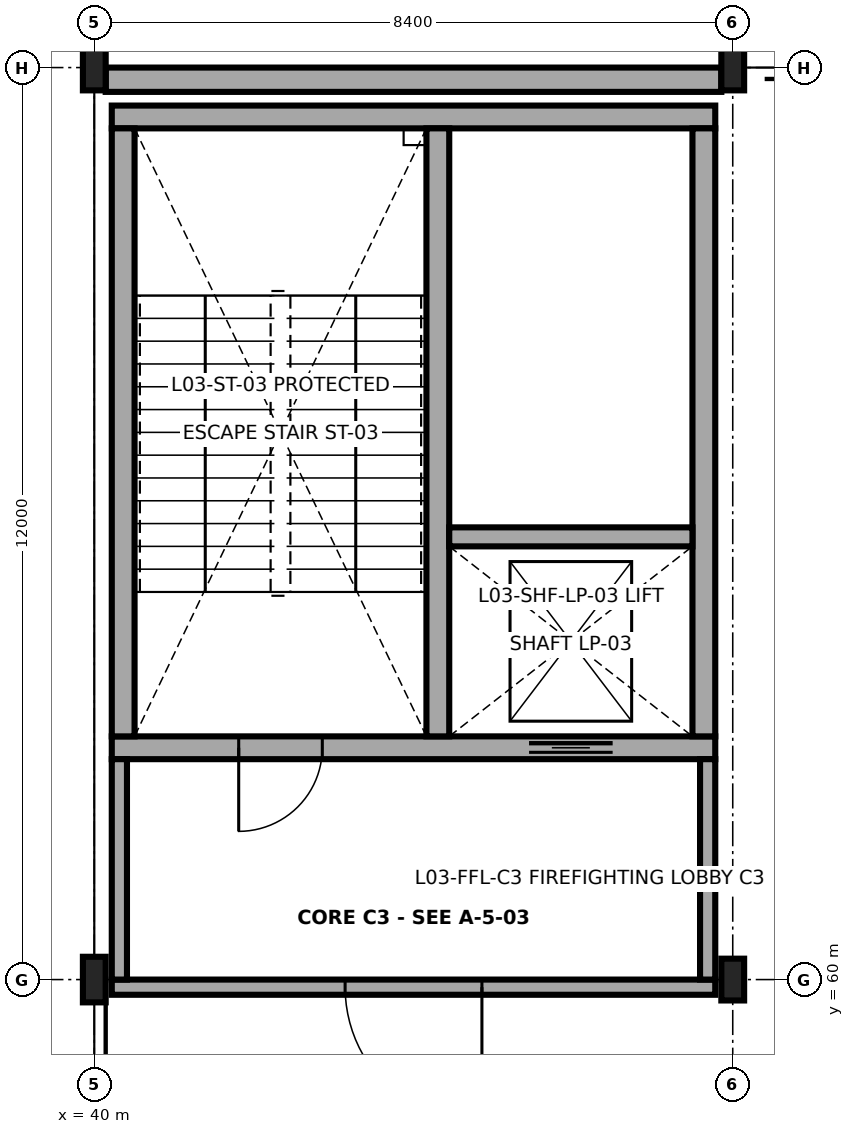
"""IFC4 building model, lengths in metres.
Left out: names, types, materials, properties, quantities, classifications, styles, units other than length and angle.
Written with IfcOpenShell. Run it as: python <this file> out.ifc"""

import sys

from ifc_helpers import new_model, si_unit, direction, frame, frame_2d, origin, origin_2d, place, context, subcontext, project, spatial, rectangle, i_section, extrude, element, fill, save


model = new_model("IFC4")
c1 = context("Model", 3, precision=1e-05, world=origin(), true_north=direction((0.0, 1.0)))
c2 = subcontext(c1, "Body", "Model", "MODEL_VIEW")
j1 = project(units=[si_unit("LENGTHUNIT", "METRE"), si_unit("PLANEANGLEUNIT", "RADIAN")], contexts=[c1])
p1 = place(None, origin())
s1 = spatial("IfcSite", under=j1, at=p1, CompositionType="ELEMENT")
p2 = place(p1, origin())
s2 = spatial("IfcBuilding", under=s1, at=p2, CompositionType="ELEMENT")
p3 = place(p2, frame((0.0, 0.0, 17.4)))
s3 = spatial("IfcBuildingStorey", under=s2, at=p3, CompositionType="ELEMENT", Elevation=17.4)
for number, where, z_axis, x_axis in (
    (1, (40.0, 60.0, 0.0), (0.0, 0.0, 1.0), (1.0, 0.0, 0.0)),
    (2, (40.0, 72.0, 0.0), (0.0, 0.0, 1.0), (1.0, 0.0, 0.0)),
):
    element("IfcColumn", number, at=place(p3, frame(where, z_axis=z_axis, x_axis=x_axis)), inside=s3, PredefinedType="COLUMN", context=c2, shape_type="SweptSolid", body=[
        extrude(i_section(OverallWidth=0.3, OverallDepth=0.6, WebThickness=0.015, FlangeThickness=0.03, FilletRadius=0.027, at=origin_2d()), origin(), (0.0, 0.0, 1.0), 4.5),
    ])
p4 = place(p3, frame((48.4, 60.0, 0.0), z_axis=(0.0, 0.0, 1.0), x_axis=(1.0, 0.0, 0.0)))
e3 = element("IfcColumn", 3, at=p4, inside=s3, PredefinedType="COLUMN", context=c2, shape_type="SweptSolid", body=[
    extrude(i_section(OverallWidth=0.3, OverallDepth=0.55, WebThickness=0.015, FlangeThickness=0.029, FilletRadius=0.027, at=origin_2d()), origin(), (0.0, 0.0, 1.0), 4.5),
])
p5 = place(p3, frame((48.4, 72.0, 0.0), z_axis=(0.0, 0.0, 1.0), x_axis=(1.0, 0.0, 0.0)))
e4 = element("IfcColumn", 4, at=p5, inside=s3, PredefinedType="COLUMN", context=c2, shape_type="SweptSolid", body=[
    extrude(i_section(OverallWidth=0.3, OverallDepth=0.6, WebThickness=0.015, FlangeThickness=0.03, FilletRadius=0.027, at=origin_2d()), origin(), (0.0, 0.0, 1.0), 4.5),
])
p6 = place(p3, frame((48.25, 71.84, 0.0), z_axis=(0.0, 0.0, 1.0), x_axis=(-1.0, 0.0, 0.0)))
e5 = element("IfcWall", 5, at=p6, inside=s3, PredefinedType="SOLIDWALL", context=c2, shape_type="SweptSolid", body=[
    extrude(rectangle(XDim=8.1, YDim=0.32, at=frame_2d((4.05, 0.0))), origin(), (0.0, 0.0, 1.0), 3.88),
])
p7 = place(p3, frame((40.23, 63.05, 0.0), z_axis=(0.0, 0.0, 1.0), x_axis=(1.0, 0.0, 0.0)))
e6 = element("IfcWall", 6, at=p7, inside=s3, PredefinedType="SHEAR", context=c2, shape_type="SweptSolid", body=[
    extrude(rectangle(XDim=7.94, YDim=0.3, at=frame_2d((3.97, 0.0))), origin(), (0.0, 0.0, 1.0), 4.25),
])
p8 = place(p7, frame((1.67, 0.0, 0.0)))
e7 = element("IfcOpeningElement", 7, at=p8, cuts=e6, PredefinedType="OPENING", context=c2, shape_type="SweptSolid", body=[
    extrude(rectangle(XDim=1.1, YDim=2.2, at=frame_2d((0.55, 1.1))), frame((0.0, 0.16, 0.0), z_axis=(0.0, -1.0, 0.0), x_axis=(1.0, 0.0, 0.0)), (0.0, 0.0, 1.0), 0.32),
])
p9 = place(p7, frame((5.49, 0.0, 0.0)))
e8 = element("IfcOpeningElement", 8, at=p9, cuts=e6, PredefinedType="OPENING", context=c2, shape_type="SweptSolid", body=[
    extrude(rectangle(XDim=1.1, YDim=2.1, at=frame_2d((0.55, 1.05))), frame((0.0, 0.16, 0.0), z_axis=(0.0, -1.0, 0.0), x_axis=(1.0, 0.0, 0.0)), (0.0, 0.0, 1.0), 0.32),
])
p10 = place(p3, frame((48.17, 71.35, 0.0), z_axis=(0.0, 0.0, 1.0), x_axis=(-1.0, 0.0, 0.0)))
e9 = element("IfcWall", 9, at=p10, inside=s3, PredefinedType="SHEAR", context=c2, shape_type="SweptSolid", body=[
    extrude(rectangle(XDim=7.94, YDim=0.3, at=frame_2d((3.97, 0.0))), origin(), (0.0, 0.0, 1.0), 4.25),
])
for number, where, z_axis, x_axis in (
    (10, (40.38, 71.2, 0.0), (0.0, 0.0, 1.0), (0.0, -1.0, 0.0)),
    (11, (48.02, 63.2, 0.0), (0.0, 0.0, 1.0), (0.0, 1.0, 0.0)),
    (12, (44.52, 63.2, 0.0), (0.0, 0.0, 1.0), (0.0, 1.0, 0.0)),
):
    element("IfcWall", number, at=place(p3, frame(where, z_axis=z_axis, x_axis=x_axis)), inside=s3, PredefinedType="SHEAR", context=c2, shape_type="SweptSolid", body=[
        extrude(rectangle(XDim=8.0, YDim=0.3, at=frame_2d((4.0, 0.0))), origin(), (0.0, 0.0, 1.0), 4.25),
    ])
p11 = place(p3, frame((44.67, 65.825, 0.0), z_axis=(0.0, 0.0, 1.0), x_axis=(1.0, 0.0, 0.0)))
e13 = element("IfcWall", 13, at=p11, inside=s3, PredefinedType="SHEAR", context=c2, shape_type="SweptSolid", body=[
    extrude(rectangle(XDim=3.2, YDim=0.25, at=frame_2d((1.6, 0.0))), origin(), (0.0, 0.0, 1.0), 4.25),
])
p12 = place(p3, frame((48.17, 59.9, 0.0), z_axis=(0.0, 0.0, 1.0), x_axis=(-1.0, 0.0, 0.0)))
e14 = element("IfcWall", 14, at=p12, inside=s3, PredefinedType="SOLIDWALL", context=c2, shape_type="SweptSolid", body=[
    extrude(rectangle(XDim=7.94, YDim=0.2, at=frame_2d((3.97, 0.0))), origin(), (0.0, 0.0, 1.0), 3.532),
])
p13 = place(p12, frame((3.07, 0.0, 0.0)))
e15 = element("IfcOpeningElement", 15, at=p13, cuts=e14, PredefinedType="OPENING", context=c2, shape_type="SweptSolid", body=[
    extrude(rectangle(XDim=1.8, YDim=2.2, at=frame_2d((0.9, 1.1))), frame((0.0, 0.11, 0.0), z_axis=(0.0, -1.0, 0.0), x_axis=(1.0, 0.0, 0.0)), (0.0, 0.0, 1.0), 0.22),
])
for number, where, z_axis, x_axis in (
    (16, (40.33, 60.0, 0.0), (0.0, 0.0, 1.0), (0.0, 1.0, 0.0)),
    (17, (48.07, 62.9, 0.0), (0.0, 0.0, 1.0), (0.0, -1.0, 0.0)),
):
    element("IfcWall", number, at=place(p3, frame(where, z_axis=z_axis, x_axis=x_axis)), inside=s3, PredefinedType="SOLIDWALL", context=c2, shape_type="SweptSolid", body=[
        extrude(rectangle(XDim=2.9, YDim=0.2, at=frame_2d((1.45, 0.0))), origin(), (0.0, 0.0, 1.0), 3.942),
    ])
p14 = place(p8, origin())
e18 = element("IfcDoor", 18, at=p14, inside=s3, OperationType="SINGLE_SWING_RIGHT", PredefinedType="DOOR", context=c2, shape_type="SweptSolid", body=[
    extrude(rectangle(XDim=1.1, YDim=2.2, at=frame_2d((0.55, 1.1))), frame((0.0, 0.025, 0.0), z_axis=(0.0, -1.0, 0.0), x_axis=(1.0, 0.0, 0.0)), (0.0, 0.0, 1.0), 0.05),
])
fill(e7, e18)
p15 = place(p9, origin())
e19 = element("IfcDoor", 19, at=p15, inside=s3, OperationType="SLIDING_TO_LEFT", PredefinedType="DOOR", context=c2, shape_type="SweptSolid", body=[
    extrude(rectangle(XDim=1.1, YDim=2.1, at=frame_2d((0.55, 1.05))), frame((0.0, 0.025, 0.0), z_axis=(0.0, -1.0, 0.0), x_axis=(1.0, 0.0, 0.0)), (0.0, 0.0, 1.0), 0.05),
])
fill(e8, e19)
p16 = place(p13, origin())
e20 = element("IfcDoor", 20, at=p16, inside=s3, OperationType="DOUBLE_DOOR_SINGLE_SWING", PredefinedType="DOOR", context=c2, shape_type="SweptSolid", body=[
    extrude(rectangle(XDim=1.8, YDim=2.2, at=frame_2d((0.9, 1.1))), frame((0.0, 0.025, 0.0), z_axis=(0.0, -1.0, 0.0), x_axis=(1.0, 0.0, 0.0)), (0.0, 0.0, 1.0), 0.05),
])
fill(e15, e20)
save(model, sys.argv[1])
